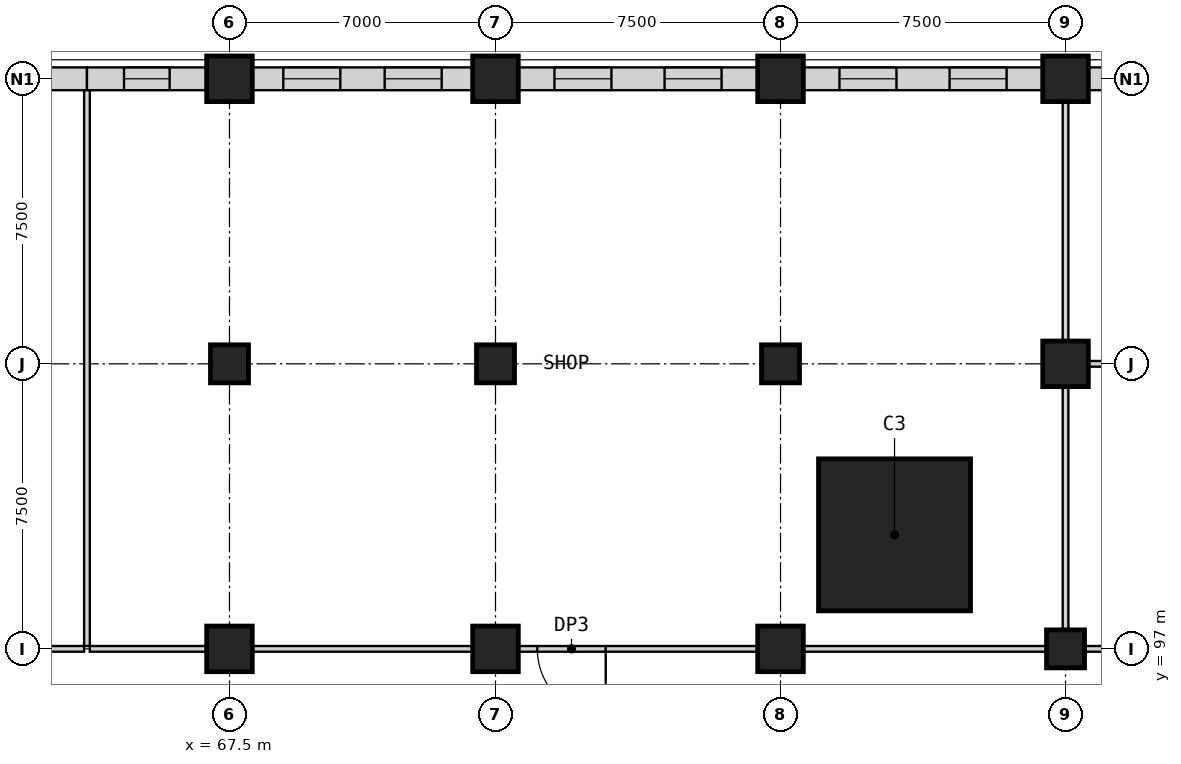
"""IFC4 building model, lengths in metres.
Left out: names, types, materials, properties, quantities, classifications, styles, units other than length and angle.
Written with IfcOpenShell. Run it as: python <this file> out.ifc"""

import sys

from ifc_helpers import new_model, si_unit, direction, frame, frame_2d, origin, origin_2d, place, context, subcontext, project, spatial, rectangle, extrude, element, fill, save


model = new_model("IFC4")
c1 = context("Model", 3, precision=1e-05, world=origin(), true_north=direction((0.0, 1.0)))
c2 = subcontext(c1, "Body", "Model", "MODEL_VIEW")
j1 = project(units=[si_unit("LENGTHUNIT", "METRE"), si_unit("PLANEANGLEUNIT", "RADIAN")], contexts=[c1])
p1 = place(None, origin())
s1 = spatial("IfcSite", under=j1, at=p1, CompositionType="ELEMENT")
p2 = place(p1, origin())
s2 = spatial("IfcBuilding", under=s1, at=p2, CompositionType="ELEMENT")
p3 = place(p2, frame((0.0, 0.0, 13.5)))
s3 = spatial("IfcBuildingStorey", under=s2, at=p3, CompositionType="ELEMENT", Elevation=13.5)
p4 = place(p3, frame((67.5, 97.0, 0.0), z_axis=(0.0, 0.0, 1.0), x_axis=(1.0, 0.0, 0.0)))
e1 = element("IfcColumn", 1, at=p4, inside=s3, PredefinedType="COLUMN", context=c2, shape_type="SweptSolid", body=[
    extrude(rectangle(XDim=1.2, YDim=1.2, at=origin_2d()), origin(), (0.0, 0.0, 1.0), 5.0),
])
p5 = place(p3, frame((67.5, 104.5, 0.0), z_axis=(0.0, 0.0, 1.0), x_axis=(1.0, 0.0, 0.0)))
e2 = element("IfcColumn", 2, at=p5, inside=s3, PredefinedType="COLUMN", context=c2, shape_type="SweptSolid", body=[
    extrude(rectangle(XDim=1.0, YDim=1.0, at=origin_2d()), origin(), (0.0, 0.0, 1.0), 5.0),
])
p6 = place(p3, frame((74.5, 97.0, 0.0), z_axis=(0.0, 0.0, 1.0), x_axis=(1.0, 0.0, 0.0)))
e3 = element("IfcColumn", 3, at=p6, inside=s3, PredefinedType="COLUMN", context=c2, shape_type="SweptSolid", body=[
    extrude(rectangle(XDim=1.2, YDim=1.2, at=origin_2d()), origin(), (0.0, 0.0, 1.0), 5.0),
])
p7 = place(p3, frame((74.5, 104.5, 0.0), z_axis=(0.0, 0.0, 1.0), x_axis=(1.0, 0.0, 0.0)))
e4 = element("IfcColumn", 4, at=p7, inside=s3, PredefinedType="COLUMN", context=c2, shape_type="SweptSolid", body=[
    extrude(rectangle(XDim=1.0, YDim=1.0, at=origin_2d()), origin(), (0.0, 0.0, 1.0), 5.0),
])
p8 = place(p3, frame((82.0, 97.0, 0.0), z_axis=(0.0, 0.0, 1.0), x_axis=(1.0, 0.0, 0.0)))
e5 = element("IfcColumn", 5, at=p8, inside=s3, PredefinedType="COLUMN", context=c2, shape_type="SweptSolid", body=[
    extrude(rectangle(XDim=1.2, YDim=1.2, at=origin_2d()), origin(), (0.0, 0.0, 1.0), 5.0),
])
for number, where, z_axis, x_axis in (
    (6, (82.0, 104.5, 0.0), (0.0, 0.0, 1.0), (1.0, 0.0, 0.0)),
    (7, (89.5, 97.0, 0.0), (0.0, 0.0, 1.0), (1.0, 0.0, 0.0)),
):
    element("IfcColumn", number, at=place(p3, frame(where, z_axis=z_axis, x_axis=x_axis)), inside=s3, PredefinedType="COLUMN", context=c2, shape_type="SweptSolid", body=[
        extrude(rectangle(XDim=1.0, YDim=1.0, at=origin_2d()), origin(), (0.0, 0.0, 1.0), 5.0),
    ])
p9 = place(p3, frame((85.0, 100.0, 0.0), z_axis=(0.0, 0.0, 1.0), x_axis=(1.0, 0.0, 0.0)))
e8 = element("IfcColumn", 8, at=p9, inside=s3, PredefinedType="COLUMN", context=c2, shape_type="SweptSolid", body=[
    extrude(rectangle(XDim=4.0, YDim=4.0, at=origin_2d()), origin(), (0.0, 0.0, 1.0), 5.0),
])
for number, where, z_axis, x_axis in (
    (9, (67.5, 112.0, 0.0), (0.0, 0.0, 1.0), (1.0, 0.0, 0.0)),
    (10, (74.5, 112.0, 0.0), (0.0, 0.0, 1.0), (1.0, 0.0, 0.0)),
    (11, (82.0, 112.0, 0.0), (0.0, 0.0, 1.0), (1.0, 0.0, 0.0)),
    (12, (89.5, 104.5, 0.0), (0.0, 0.0, 1.0), (1.0, 0.0, 0.0)),
    (13, (89.5, 112.0, 0.0), (0.0, 0.0, 1.0), (1.0, 0.0, 0.0)),
):
    element("IfcColumn", number, at=place(p3, frame(where, z_axis=z_axis, x_axis=x_axis)), inside=s3, PredefinedType="COLUMN", context=c2, shape_type="SweptSolid", body=[
        extrude(rectangle(XDim=1.2, YDim=1.2, at=origin_2d()), origin(), (0.0, 0.0, 1.0), 5.0),
    ])
for number, where, z_axis, x_axis in (
    (14, (60.6, 97.0, 0.0), (0.0, 0.0, 1.0), (1.0, 0.0, 0.0)),
    (15, (63.825, 97.0, 0.0), (0.0, 0.0, 1.0), (1.0, 0.0, 0.0)),
):
    element("IfcWall", number, at=place(p3, frame(where, z_axis=z_axis, x_axis=x_axis)), inside=s3, PredefinedType="PARTITIONING", context=c2, shape_type="SweptSolid", body=[
        extrude(rectangle(XDim=3.075, YDim=0.15, at=frame_2d((1.538, 0.0))), origin(), (0.0, 0.0, 1.0), 4.7),
    ])
p10 = place(p3, frame((68.1, 97.0, 0.0), z_axis=(0.0, 0.0, 1.0), x_axis=(1.0, 0.0, 0.0)))
e16 = element("IfcWall", 16, at=p10, inside=s3, PredefinedType="PARTITIONING", context=c2, shape_type="SweptSolid", body=[
    extrude(rectangle(XDim=5.8, YDim=0.15, at=frame_2d((2.9, 0.0))), origin(), (0.0, 0.0, 1.0), 4.7),
])
p11 = place(p3, frame((81.4, 97.0, 0.0), z_axis=(0.0, 0.0, 1.0), x_axis=(-1.0, 0.0, 0.0)))
e17 = element("IfcWall", 17, at=p11, inside=s3, PredefinedType="PARTITIONING", context=c2, shape_type="SweptSolid", body=[
    extrude(rectangle(XDim=6.3, YDim=0.15, at=frame_2d((3.15, 0.0))), origin(), (0.0, 0.0, 1.0), 4.7),
])
p12 = place(p11, frame((4.0, 0.0, 0.0)))
e18 = element("IfcOpeningElement", 18, at=p12, cuts=e17, PredefinedType="OPENING", context=c2, shape_type="SweptSolid", body=[
    extrude(rectangle(XDim=1.8, YDim=2.4, at=frame_2d((0.9, 1.2))), frame((0.0, 0.085, 0.0), z_axis=(0.0, -1.0, 0.0), x_axis=(1.0, 0.0, 0.0)), (0.0, 0.0, 1.0), 0.17),
])
for number, where, z_axis, x_axis in (
    (19, (82.6, 97.0, 0.0), (0.0, 0.0, 1.0), (1.0, 0.0, 0.0)),
    (20, (90.0, 97.0, 0.0), (0.0, 0.0, 1.0), (1.0, 0.0, 0.0)),
):
    element("IfcWall", number, at=place(p3, frame(where, z_axis=z_axis, x_axis=x_axis)), inside=s3, PredefinedType="PARTITIONING", context=c2, shape_type="SweptSolid", body=[
        extrude(rectangle(XDim=6.4, YDim=0.15, at=frame_2d((3.2, 0.0))), origin(), (0.0, 0.0, 1.0), 4.7),
    ])
p13 = place(p3, frame((60.6, 112.0, 0.0), z_axis=(0.0, 0.0, 1.0), x_axis=(1.0, 0.0, 0.0)))
e21 = element("IfcWall", 21, at=p13, inside=s3, PredefinedType="PARTITIONING", context=c2, shape_type="SweptSolid", body=[
    extrude(rectangle(XDim=3.15, YDim=0.6, at=frame_2d((1.575, 0.0))), origin(), (0.0, 0.0, 1.0), 4.1),
])
p14 = place(p13, frame((0.975, 0.0, 0.9)))
e22 = element("IfcOpeningElement", 22, at=p14, cuts=e21, PredefinedType="OPENING", context=c2, shape_type="SweptSolid", body=[
    extrude(rectangle(XDim=1.2, YDim=2.8, at=frame_2d((0.6, 1.4))), frame((0.0, 0.31, 0.0), z_axis=(0.0, -1.0, 0.0), x_axis=(1.0, 0.0, 0.0)), (0.0, 0.0, 1.0), 0.62),
])
p15 = place(p3, frame((63.75, 112.0, 0.0), z_axis=(0.0, 0.0, 1.0), x_axis=(1.0, 0.0, 0.0)))
e23 = element("IfcWall", 23, at=p15, inside=s3, PredefinedType="PARTITIONING", context=c2, shape_type="SweptSolid", body=[
    extrude(rectangle(XDim=3.15, YDim=0.6, at=frame_2d((1.575, 0.0))), origin(), (0.0, 0.0, 1.0), 4.1),
])
p16 = place(p15, frame((0.975, 0.0, 0.9)))
e24 = element("IfcOpeningElement", 24, at=p16, cuts=e23, PredefinedType="OPENING", context=c2, shape_type="SweptSolid", body=[
    extrude(rectangle(XDim=1.2, YDim=2.8, at=frame_2d((0.6, 1.4))), frame((0.0, 0.31, 0.0), z_axis=(0.0, -1.0, 0.0), x_axis=(1.0, 0.0, 0.0)), (0.0, 0.0, 1.0), 0.62),
])
p17 = place(p3, frame((68.1, 112.0, 0.0), z_axis=(0.0, 0.0, 1.0), x_axis=(1.0, 0.0, 0.0)))
e25 = element("IfcWall", 25, at=p17, inside=s3, PredefinedType="PARTITIONING", context=c2, shape_type="SweptSolid", body=[
    extrude(rectangle(XDim=5.8, YDim=0.6, at=frame_2d((2.9, 0.0))), origin(), (0.0, 0.0, 1.0), 4.1),
])
p18 = place(p17, frame((0.816, 0.0, 0.9)))
e26 = element("IfcOpeningElement", 26, at=p18, cuts=e25, PredefinedType="OPENING", context=c2, shape_type="SweptSolid", body=[
    extrude(rectangle(XDim=1.5, YDim=2.8, at=frame_2d((0.75, 1.4))), frame((0.0, 0.31, 0.0), z_axis=(0.0, -1.0, 0.0), x_axis=(1.0, 0.0, 0.0)), (0.0, 0.0, 1.0), 0.62),
])
p19 = place(p17, frame((3.484, 0.0, 0.9)))
e27 = element("IfcOpeningElement", 27, at=p19, cuts=e25, PredefinedType="OPENING", context=c2, shape_type="SweptSolid", body=[
    extrude(rectangle(XDim=1.5, YDim=2.8, at=frame_2d((0.75, 1.4))), frame((0.0, 0.31, 0.0), z_axis=(0.0, -1.0, 0.0), x_axis=(1.0, 0.0, 0.0)), (0.0, 0.0, 1.0), 0.62),
])
p20 = place(p3, frame((75.1, 112.0, 0.0), z_axis=(0.0, 0.0, 1.0), x_axis=(1.0, 0.0, 0.0)))
e28 = element("IfcWall", 28, at=p20, inside=s3, PredefinedType="PARTITIONING", context=c2, shape_type="SweptSolid", body=[
    extrude(rectangle(XDim=6.3, YDim=0.6, at=frame_2d((3.15, 0.0))), origin(), (0.0, 0.0, 1.0), 4.1),
])
p21 = place(p20, frame((0.951, 0.0, 0.9)))
e29 = element("IfcOpeningElement", 29, at=p21, cuts=e28, PredefinedType="OPENING", context=c2, shape_type="SweptSolid", body=[
    extrude(rectangle(XDim=1.5, YDim=2.8, at=frame_2d((0.75, 1.4))), frame((0.0, 0.31, 0.0), z_axis=(0.0, -1.0, 0.0), x_axis=(1.0, 0.0, 0.0)), (0.0, 0.0, 1.0), 0.62),
])
p22 = place(p20, frame((3.849, 0.0, 0.9)))
e30 = element("IfcOpeningElement", 30, at=p22, cuts=e28, PredefinedType="OPENING", context=c2, shape_type="SweptSolid", body=[
    extrude(rectangle(XDim=1.5, YDim=2.8, at=frame_2d((0.75, 1.4))), frame((0.0, 0.31, 0.0), z_axis=(0.0, -1.0, 0.0), x_axis=(1.0, 0.0, 0.0)), (0.0, 0.0, 1.0), 0.62),
])
p23 = place(p3, frame((82.6, 112.0, 0.0), z_axis=(0.0, 0.0, 1.0), x_axis=(1.0, 0.0, 0.0)))
e31 = element("IfcWall", 31, at=p23, inside=s3, PredefinedType="PARTITIONING", context=c2, shape_type="SweptSolid", body=[
    extrude(rectangle(XDim=6.3, YDim=0.6, at=frame_2d((3.15, 0.0))), origin(), (0.0, 0.0, 1.0), 4.1),
])
p24 = place(p23, frame((0.951, 0.0, 0.9)))
e32 = element("IfcOpeningElement", 32, at=p24, cuts=e31, PredefinedType="OPENING", context=c2, shape_type="SweptSolid", body=[
    extrude(rectangle(XDim=1.5, YDim=2.8, at=frame_2d((0.75, 1.4))), frame((0.0, 0.31, 0.0), z_axis=(0.0, -1.0, 0.0), x_axis=(1.0, 0.0, 0.0)), (0.0, 0.0, 1.0), 0.62),
])
p25 = place(p23, frame((3.849, 0.0, 0.9)))
e33 = element("IfcOpeningElement", 33, at=p25, cuts=e31, PredefinedType="OPENING", context=c2, shape_type="SweptSolid", body=[
    extrude(rectangle(XDim=1.5, YDim=2.8, at=frame_2d((0.75, 1.4))), frame((0.0, 0.31, 0.0), z_axis=(0.0, -1.0, 0.0), x_axis=(1.0, 0.0, 0.0)), (0.0, 0.0, 1.0), 0.62),
])
p26 = place(p3, frame((90.1, 112.0, 0.0), z_axis=(0.0, 0.0, 1.0), x_axis=(1.0, 0.0, 0.0)))
e34 = element("IfcWall", 34, at=p26, inside=s3, PredefinedType="PARTITIONING", context=c2, shape_type="SweptSolid", body=[
    extrude(rectangle(XDim=6.3, YDim=0.6, at=frame_2d((3.15, 0.0))), origin(), (0.0, 0.0, 1.0), 4.1),
])
p27 = place(p26, frame((0.951, 0.0, 0.9)))
e35 = element("IfcOpeningElement", 35, at=p27, cuts=e34, PredefinedType="OPENING", context=c2, shape_type="SweptSolid", body=[
    extrude(rectangle(XDim=1.5, YDim=2.8, at=frame_2d((0.75, 1.4))), frame((0.0, 0.31, 0.0), z_axis=(0.0, -1.0, 0.0), x_axis=(1.0, 0.0, 0.0)), (0.0, 0.0, 1.0), 0.62),
])
p28 = place(p26, frame((3.849, 0.0, 0.9)))
e36 = element("IfcOpeningElement", 36, at=p28, cuts=e34, PredefinedType="OPENING", context=c2, shape_type="SweptSolid", body=[
    extrude(rectangle(XDim=1.5, YDim=2.8, at=frame_2d((0.75, 1.4))), frame((0.0, 0.31, 0.0), z_axis=(0.0, -1.0, 0.0), x_axis=(1.0, 0.0, 0.0)), (0.0, 0.0, 1.0), 0.62),
])
p29 = place(p3, frame((90.1, 104.5, 0.0), z_axis=(0.0, 0.0, 1.0), x_axis=(1.0, 0.0, 0.0)))
e37 = element("IfcWall", 37, at=p29, inside=s3, PredefinedType="PARTITIONING", context=c2, shape_type="SweptSolid", body=[
    extrude(rectangle(XDim=6.3, YDim=0.15, at=frame_2d((3.15, 0.0))), origin(), (0.0, 0.0, 1.0), 4.7),
])
p30 = place(p3, frame((89.5, 97.5, 0.0), z_axis=(0.0, 0.0, 1.0), x_axis=(0.0, 1.0, 0.0)))
e38 = element("IfcWall", 38, at=p30, inside=s3, PredefinedType="PARTITIONING", context=c2, shape_type="SweptSolid", body=[
    extrude(rectangle(XDim=6.4, YDim=0.15, at=frame_2d((3.2, 0.0))), origin(), (0.0, 0.0, 1.0), 4.7),
])
p31 = place(p3, frame((89.5, 105.1, 0.0), z_axis=(0.0, 0.0, 1.0), x_axis=(0.0, 1.0, 0.0)))
e39 = element("IfcWall", 39, at=p31, inside=s3, PredefinedType="PARTITIONING", context=c2, shape_type="SweptSolid", body=[
    extrude(rectangle(XDim=6.3, YDim=0.15, at=frame_2d((3.15, 0.0))), origin(), (0.0, 0.0, 1.0), 4.7),
])
p32 = place(p3, frame((63.75, 97.075, 0.0), z_axis=(0.0, 0.0, 1.0), x_axis=(0.0, 1.0, 0.0)))
e40 = element("IfcWall", 40, at=p32, inside=s3, PredefinedType="PARTITIONING", context=c2, shape_type="SweptSolid", body=[
    extrude(rectangle(XDim=14.625, YDim=0.15, at=frame_2d((7.312, 0.0))), origin(), (0.0, 0.0, 1.0), 4.7),
])
p33 = place(p12, origin())
e41 = element("IfcDoor", 41, at=p33, inside=s3, OperationType="SINGLE_SWING_LEFT", PredefinedType="DOOR", context=c2, shape_type="SweptSolid", body=[
    extrude(rectangle(XDim=1.8, YDim=2.4, at=frame_2d((0.9, 1.2))), frame((0.0, 0.025, 0.0), z_axis=(0.0, -1.0, 0.0), x_axis=(1.0, 0.0, 0.0)), (0.0, 0.0, 1.0), 0.05),
])
fill(e18, e41)
p34 = place(p16, origin())
e42 = element("IfcWindow", 42, at=p34, inside=s3, PartitioningType="SINGLE_PANEL", PredefinedType="WINDOW", context=c2, shape_type="SweptSolid", body=[
    extrude(rectangle(XDim=1.2, YDim=2.8, at=frame_2d((0.6, 1.4))), frame((0.0, 0.03, 0.0), z_axis=(0.0, -1.0, 0.0), x_axis=(1.0, 0.0, 0.0)), (0.0, 0.0, 1.0), 0.06),
])
fill(e24, e42)
p35 = place(p18, origin())
e43 = element("IfcWindow", 43, at=p35, inside=s3, PartitioningType="SINGLE_PANEL", PredefinedType="WINDOW", context=c2, shape_type="SweptSolid", body=[
    extrude(rectangle(XDim=1.5, YDim=2.8, at=frame_2d((0.75, 1.4))), frame((0.0, 0.03, 0.0), z_axis=(0.0, -1.0, 0.0), x_axis=(1.0, 0.0, 0.0)), (0.0, 0.0, 1.0), 0.06),
])
fill(e26, e43)
p36 = place(p19, origin())
e44 = element("IfcWindow", 44, at=p36, inside=s3, PartitioningType="SINGLE_PANEL", PredefinedType="WINDOW", context=c2, shape_type="SweptSolid", body=[
    extrude(rectangle(XDim=1.5, YDim=2.8, at=frame_2d((0.75, 1.4))), frame((0.0, 0.03, 0.0), z_axis=(0.0, -1.0, 0.0), x_axis=(1.0, 0.0, 0.0)), (0.0, 0.0, 1.0), 0.06),
])
fill(e27, e44)
p37 = place(p21, origin())
e45 = element("IfcWindow", 45, at=p37, inside=s3, PartitioningType="SINGLE_PANEL", PredefinedType="WINDOW", context=c2, shape_type="SweptSolid", body=[
    extrude(rectangle(XDim=1.5, YDim=2.8, at=frame_2d((0.75, 1.4))), frame((0.0, 0.03, 0.0), z_axis=(0.0, -1.0, 0.0), x_axis=(1.0, 0.0, 0.0)), (0.0, 0.0, 1.0), 0.06),
])
fill(e29, e45)
p38 = place(p22, origin())
e46 = element("IfcWindow", 46, at=p38, inside=s3, PartitioningType="SINGLE_PANEL", PredefinedType="WINDOW", context=c2, shape_type="SweptSolid", body=[
    extrude(rectangle(XDim=1.5, YDim=2.8, at=frame_2d((0.75, 1.4))), frame((0.0, 0.03, 0.0), z_axis=(0.0, -1.0, 0.0), x_axis=(1.0, 0.0, 0.0)), (0.0, 0.0, 1.0), 0.06),
])
fill(e30, e46)
p39 = place(p24, origin())
e47 = element("IfcWindow", 47, at=p39, inside=s3, PartitioningType="SINGLE_PANEL", PredefinedType="WINDOW", context=c2, shape_type="SweptSolid", body=[
    extrude(rectangle(XDim=1.5, YDim=2.8, at=frame_2d((0.75, 1.4))), frame((0.0, 0.03, 0.0), z_axis=(0.0, -1.0, 0.0), x_axis=(1.0, 0.0, 0.0)), (0.0, 0.0, 1.0), 0.06),
])
fill(e32, e47)
p40 = place(p25, origin())
e48 = element("IfcWindow", 48, at=p40, inside=s3, PartitioningType="SINGLE_PANEL", PredefinedType="WINDOW", context=c2, shape_type="SweptSolid", body=[
    extrude(rectangle(XDim=1.5, YDim=2.8, at=frame_2d((0.75, 1.4))), frame((0.0, 0.03, 0.0), z_axis=(0.0, -1.0, 0.0), x_axis=(1.0, 0.0, 0.0)), (0.0, 0.0, 1.0), 0.06),
])
fill(e33, e48)
save(model, sys.argv[1])
